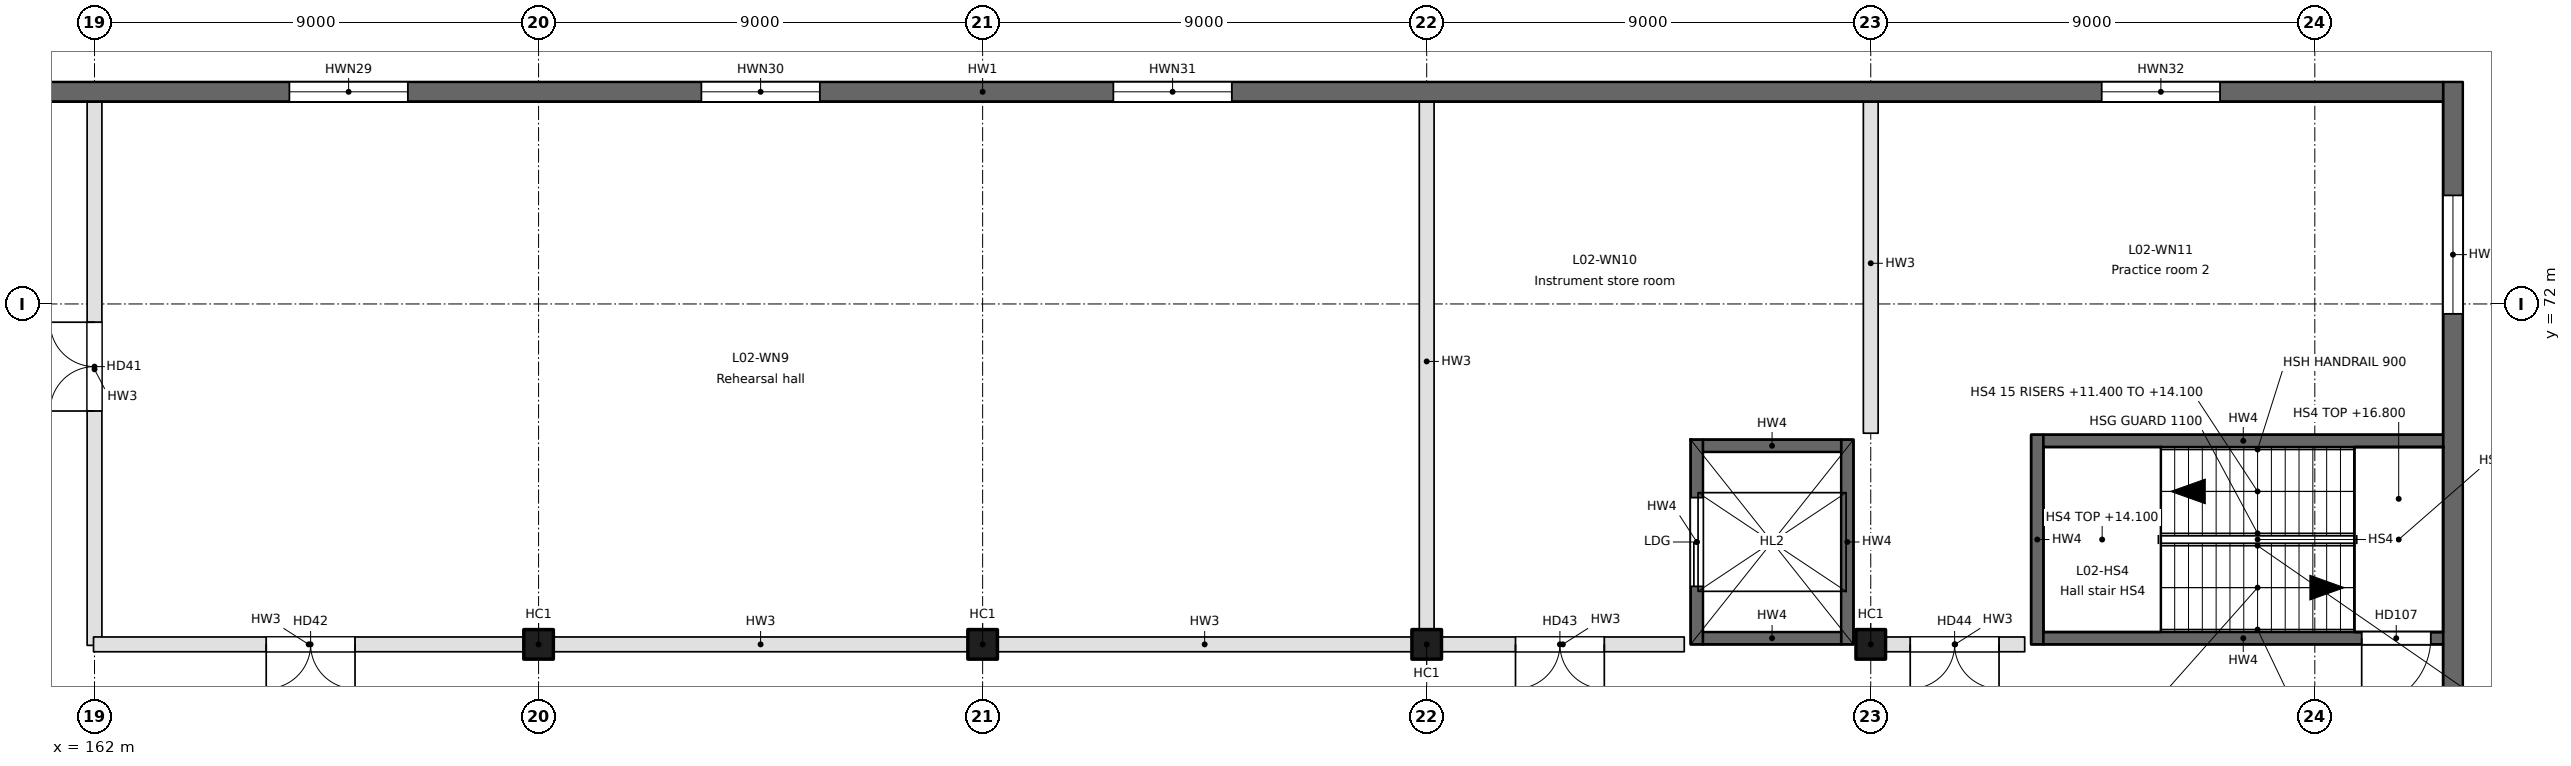
"""IFC4 building model, lengths in metres.
Left out: names, types, materials, properties, quantities, classifications, styles, units other than length and angle.
Written with IfcOpenShell. Run it as: python <this file> out.ifc"""

import sys

from ifc_helpers import new_model, si_unit, direction, frame, frame_2d, origin, origin_2d, place, context, subcontext, project, spatial, rectangle, extrude, element, fill, save


model = new_model("IFC4")
c1 = context("Model", 3, precision=1e-05, world=origin(), true_north=direction((0.0, 1.0)))
c2 = subcontext(c1, "Body", "Model", "MODEL_VIEW")
j1 = project(units=[si_unit("LENGTHUNIT", "METRE"), si_unit("PLANEANGLEUNIT", "RADIAN")], contexts=[c1])
p1 = place(None, origin())
s1 = spatial("IfcSite", under=j1, at=p1, CompositionType="ELEMENT")
p2 = place(p1, origin())
s2 = spatial("IfcBuilding", under=s1, at=p2, CompositionType="ELEMENT")
p3 = place(p2, frame((0.0, 0.0, 11.4)))
s3 = spatial("IfcBuildingStorey", under=s2, at=p3, CompositionType="ELEMENT", Elevation=11.4)
for number, where, z_axis, x_axis in (
    (1, (171.0, 65.1, 0.0), (0.0, 0.0, 1.0), (1.0, 0.0, 0.0)),
    (2, (180.0, 65.1, 0.0), (0.0, 0.0, 1.0), (1.0, 0.0, 0.0)),
    (3, (189.0, 65.1, 0.0), (0.0, 0.0, 1.0), (1.0, 0.0, 0.0)),
    (4, (198.0, 65.1, 0.0), (0.0, 0.0, 1.0), (1.0, 0.0, 0.0)),
):
    element("IfcColumn", number, at=place(p3, frame(where, z_axis=z_axis, x_axis=x_axis)), inside=s3, PredefinedType="COLUMN", context=c2, shape_type="SweptSolid", body=[
        extrude(rectangle(XDim=0.6, YDim=0.6, at=origin_2d()), origin(), (0.0, 0.0, 1.0), 5.4),
    ])
p4 = place(p3, frame((209.8, 76.5, -0.35), z_axis=(0.0, 0.0, 1.0), x_axis=(0.0, -1.0, 0.0)))
e5 = element("IfcWall", 5, at=p4, inside=s3, PredefinedType="SOLIDWALL", context=c2, shape_type="SweptSolid", body=[
    extrude(rectangle(XDim=54.0, YDim=0.4, at=frame_2d((27.0, 0.0))), origin(), (0.0, 0.0, 1.0), 5.4),
])
p5 = place(p4, frame((49.3, 0.0, 1.25)))
e6 = element("IfcOpeningElement", 6, at=p5, cuts=e5, PredefinedType="OPENING", context=c2, shape_type="SweptSolid", body=[
    extrude(rectangle(XDim=2.4, YDim=1.8, at=frame_2d((1.2, 0.9))), frame((0.0, 0.2, 0.0), z_axis=(0.0, -1.0, 0.0), x_axis=(1.0, 0.0, 0.0)), (0.0, 0.0, 1.0), 0.4),
])
p6 = place(p4, frame((2.3, 0.0, 1.25)))
e7 = element("IfcOpeningElement", 7, at=p6, cuts=e5, PredefinedType="OPENING", context=c2, shape_type="SweptSolid", body=[
    extrude(rectangle(XDim=2.4, YDim=1.8, at=frame_2d((1.2, 0.9))), frame((0.0, 0.2, 0.0), z_axis=(0.0, -1.0, 0.0), x_axis=(1.0, 0.0, 0.0)), (0.0, 0.0, 1.0), 0.4),
])
p7 = place(p3, frame((150.4, 76.3, -0.35), z_axis=(0.0, 0.0, 1.0), x_axis=(1.0, 0.0, 0.0)))
e8 = element("IfcWall", 8, at=p7, inside=s3, PredefinedType="SOLIDWALL", context=c2, shape_type="SweptSolid", body=[
    extrude(rectangle(XDim=59.2, YDim=0.4, at=frame_2d((29.6, 0.0))), origin(), (0.0, 0.0, 1.0), 5.4),
])
p8 = place(p7, frame((7.6, 0.0, 1.25)))
e9 = element("IfcOpeningElement", 9, at=p8, cuts=e8, PredefinedType="OPENING", context=c2, shape_type="SweptSolid", body=[
    extrude(rectangle(XDim=2.4, YDim=1.8, at=frame_2d((1.2, 0.9))), frame((0.0, 0.2, 0.0), z_axis=(0.0, -1.0, 0.0), x_axis=(1.0, 0.0, 0.0)), (0.0, 0.0, 1.0), 0.4),
])
p9 = place(p7, frame((15.55, 0.0, 1.25)))
e10 = element("IfcOpeningElement", 10, at=p9, cuts=e8, PredefinedType="OPENING", context=c2, shape_type="SweptSolid", body=[
    extrude(rectangle(XDim=2.4, YDim=1.8, at=frame_2d((1.2, 0.9))), frame((0.0, 0.2, 0.0), z_axis=(0.0, -1.0, 0.0), x_axis=(1.0, 0.0, 0.0)), (0.0, 0.0, 1.0), 0.4),
])
p10 = place(p7, frame((23.9, 0.0, 1.25)))
e11 = element("IfcOpeningElement", 11, at=p10, cuts=e8, PredefinedType="OPENING", context=c2, shape_type="SweptSolid", body=[
    extrude(rectangle(XDim=2.4, YDim=1.8, at=frame_2d((1.2, 0.9))), frame((0.0, 0.2, 0.0), z_axis=(0.0, -1.0, 0.0), x_axis=(1.0, 0.0, 0.0)), (0.0, 0.0, 1.0), 0.4),
])
p11 = place(p7, frame((32.25, 0.0, 1.25)))
e12 = element("IfcOpeningElement", 12, at=p11, cuts=e8, PredefinedType="OPENING", context=c2, shape_type="SweptSolid", body=[
    extrude(rectangle(XDim=2.4, YDim=1.8, at=frame_2d((1.2, 0.9))), frame((0.0, 0.2, 0.0), z_axis=(0.0, -1.0, 0.0), x_axis=(1.0, 0.0, 0.0)), (0.0, 0.0, 1.0), 0.4),
])
p12 = place(p7, frame((52.28, 0.0, 1.25)))
e13 = element("IfcOpeningElement", 13, at=p12, cuts=e8, PredefinedType="OPENING", context=c2, shape_type="SweptSolid", body=[
    extrude(rectangle(XDim=2.4, YDim=1.8, at=frame_2d((1.2, 0.9))), frame((0.0, 0.2, 0.0), z_axis=(0.0, -1.0, 0.0), x_axis=(1.0, 0.0, 0.0)), (0.0, 0.0, 1.0), 0.4),
])
p13 = place(p3, frame((162.0, 65.08, 0.0), z_axis=(0.0, 0.0, 1.0), x_axis=(0.0, 1.0, 0.0)))
e14 = element("IfcWall", 14, at=p13, inside=s3, PredefinedType="PARTITIONING", context=c2, shape_type="SweptSolid", body=[
    extrude(rectangle(XDim=11.19, YDim=0.3, at=frame_2d((5.595, 0.0))), origin(), (0.0, 0.0, 1.0), 5.05),
])
p14 = place(p13, frame((4.75, 0.0, 0.0)))
e15 = element("IfcOpeningElement", 15, at=p14, cuts=e14, PredefinedType="OPENING", context=c2, shape_type="SweptSolid", body=[
    extrude(rectangle(XDim=1.8, YDim=2.1, at=frame_2d((0.9, 1.05))), frame((0.0, 0.15, 0.0), z_axis=(0.0, -1.0, 0.0), x_axis=(1.0, 0.0, 0.0)), (0.0, 0.0, 1.0), 0.3),
])
p15 = place(p3, frame((198.0, 69.38, 0.0), z_axis=(0.0, 0.0, 1.0), x_axis=(0.0, 1.0, 0.0)))
e16 = element("IfcWall", 16, at=p15, inside=s3, PredefinedType="PARTITIONING", context=c2, shape_type="SweptSolid", body=[
    extrude(rectangle(XDim=6.89, YDim=0.3, at=frame_2d((3.445, 0.0))), origin(), (0.0, 0.0, 1.0), 5.05),
])
p16 = place(p3, frame((189.0, 65.4, 0.0), z_axis=(0.0, 0.0, 1.0), x_axis=(0.0, 1.0, 0.0)))
e17 = element("IfcWall", 17, at=p16, inside=s3, PredefinedType="PARTITIONING", context=c2, shape_type="SweptSolid", body=[
    extrude(rectangle(XDim=10.87, YDim=0.3, at=frame_2d((5.435, 0.0))), origin(), (0.0, 0.0, 1.0), 5.05),
])
p17 = place(p3, frame((170.7, 65.1, 0.0), z_axis=(0.0, 0.0, 1.0), x_axis=(-1.0, 0.0, 0.0)))
e18 = element("IfcWall", 18, at=p17, inside=s3, PredefinedType="PARTITIONING", context=c2, shape_type="SweptSolid", body=[
    extrude(rectangle(XDim=8.72, YDim=0.3, at=frame_2d((4.36, 0.0))), origin(), (0.0, 0.0, 1.0), 5.05),
])
p18 = place(p17, frame((3.42, 0.0, 0.0)))
e19 = element("IfcOpeningElement", 19, at=p18, cuts=e18, PredefinedType="OPENING", context=c2, shape_type="SweptSolid", body=[
    extrude(rectangle(XDim=1.8, YDim=2.1, at=frame_2d((0.9, 1.05))), frame((0.0, 0.15, 0.0), z_axis=(0.0, -1.0, 0.0), x_axis=(1.0, 0.0, 0.0)), (0.0, 0.0, 1.0), 0.3),
])
for number, where, z_axis, x_axis in (
    (20, (179.7, 65.1, 0.0), (0.0, 0.0, 1.0), (-1.0, 0.0, 0.0)),
    (21, (188.7, 65.1, 0.0), (0.0, 0.0, 1.0), (-1.0, 0.0, 0.0)),
):
    element("IfcWall", number, at=place(p3, frame(where, z_axis=z_axis, x_axis=x_axis)), inside=s3, PredefinedType="PARTITIONING", context=c2, shape_type="SweptSolid", body=[
        extrude(rectangle(XDim=8.4, YDim=0.3, at=frame_2d((4.2, 0.0))), origin(), (0.0, 0.0, 1.0), 5.05),
    ])
p19 = place(p3, frame((194.22, 65.1, 0.0), z_axis=(0.0, 0.0, 1.0), x_axis=(-1.0, 0.0, 0.0)))
e22 = element("IfcWall", 22, at=p19, inside=s3, PredefinedType="PARTITIONING", context=c2, shape_type="SweptSolid", body=[
    extrude(rectangle(XDim=4.92, YDim=0.3, at=frame_2d((2.46, 0.0))), origin(), (0.0, 0.0, 1.0), 5.05),
])
p20 = place(p19, frame((1.62, 0.0, 0.0)))
e23 = element("IfcOpeningElement", 23, at=p20, cuts=e22, PredefinedType="OPENING", context=c2, shape_type="SweptSolid", body=[
    extrude(rectangle(XDim=1.8, YDim=2.1, at=frame_2d((0.9, 1.05))), frame((0.0, 0.15, 0.0), z_axis=(0.0, -1.0, 0.0), x_axis=(1.0, 0.0, 0.0)), (0.0, 0.0, 1.0), 0.3),
])
p21 = place(p3, frame((201.12, 65.1, 0.0), z_axis=(0.0, 0.0, 1.0), x_axis=(-1.0, 0.0, 0.0)))
e24 = element("IfcWall", 24, at=p21, inside=s3, PredefinedType="PARTITIONING", context=c2, shape_type="SweptSolid", body=[
    extrude(rectangle(XDim=2.82, YDim=0.3, at=frame_2d((1.41, 0.0))), origin(), (0.0, 0.0, 1.0), 5.05),
])
p22 = place(p21, frame((0.52, 0.0, 0.0)))
e25 = element("IfcOpeningElement", 25, at=p22, cuts=e24, PredefinedType="OPENING", context=c2, shape_type="SweptSolid", body=[
    extrude(rectangle(XDim=1.8, YDim=2.1, at=frame_2d((0.9, 1.05))), frame((0.0, 0.15, 0.0), z_axis=(0.0, -1.0, 0.0), x_axis=(1.0, 0.0, 0.0)), (0.0, 0.0, 1.0), 0.3),
])
p23 = place(p3, frame((201.375, 65.1, -0.35), z_axis=(0.0, 0.0, 1.0), x_axis=(0.0, 1.0, 0.0)))
e26 = element("IfcWall", 26, at=p23, inside=s3, PredefinedType="SOLIDWALL", context=c2, shape_type="SweptSolid", body=[
    extrude(rectangle(XDim=4.25, YDim=0.25, at=frame_2d((2.125, 0.0))), origin(), (0.0, 0.0, 1.0), 5.4),
])
p24 = place(p3, frame((209.6, 65.225, -0.35), z_axis=(0.0, 0.0, 1.0), x_axis=(-1.0, 0.0, 0.0)))
e27 = element("IfcWall", 27, at=p24, inside=s3, PredefinedType="SOLIDWALL", context=c2, shape_type="SweptSolid", body=[
    extrude(rectangle(XDim=8.1, YDim=0.25, at=frame_2d((4.05, 0.0))), origin(), (0.0, 0.0, 1.0), 5.4),
])
p25 = place(p24, frame((0.25, 0.0, 0.35)))
e28 = element("IfcOpeningElement", 28, at=p25, cuts=e27, PredefinedType="OPENING", context=c2, shape_type="SweptSolid", body=[
    extrude(rectangle(XDim=1.4, YDim=2.1, at=frame_2d((0.7, 1.05))), frame((0.0, 0.125, 0.0), z_axis=(0.0, -1.0, 0.0), x_axis=(1.0, 0.0, 0.0)), (0.0, 0.0, 1.0), 0.25),
])
p26 = place(p3, frame((201.5, 69.225, -0.35), z_axis=(0.0, 0.0, 1.0), x_axis=(1.0, 0.0, 0.0)))
e29 = element("IfcWall", 29, at=p26, inside=s3, PredefinedType="SOLIDWALL", context=c2, shape_type="SweptSolid", body=[
    extrude(rectangle(XDim=8.1, YDim=0.25, at=frame_2d((4.05, 0.0))), origin(), (0.0, 0.0, 1.0), 5.4),
])
p27 = place(p3, frame((194.475, 65.1, -0.35), z_axis=(0.0, 0.0, 1.0), x_axis=(0.0, 1.0, 0.0)))
e30 = element("IfcWall", 30, at=p27, inside=s3, PredefinedType="SOLIDWALL", context=c2, shape_type="SweptSolid", body=[
    extrude(rectangle(XDim=4.15, YDim=0.25, at=frame_2d((2.075, 0.0))), origin(), (0.0, 0.0, 1.0), 5.4),
])
p28 = place(p27, frame((1.175, 0.0, 0.35)))
e31 = element("IfcOpeningElement", 31, at=p28, cuts=e30, PredefinedType="OPENING", context=c2, shape_type="SweptSolid", body=[
    extrude(rectangle(XDim=1.8, YDim=2.4, at=frame_2d((0.9, 1.2))), frame((0.0, 0.125, 0.0), z_axis=(0.0, -1.0, 0.0), x_axis=(1.0, 0.0, 0.0)), (0.0, 0.0, 1.0), 0.25),
])
p29 = place(p3, frame((197.525, 69.25, -0.35), z_axis=(0.0, 0.0, 1.0), x_axis=(0.0, -1.0, 0.0)))
e32 = element("IfcWall", 32, at=p29, inside=s3, PredefinedType="SOLIDWALL", context=c2, shape_type="SweptSolid", body=[
    extrude(rectangle(XDim=4.15, YDim=0.25, at=frame_2d((2.075, 0.0))), origin(), (0.0, 0.0, 1.0), 5.4),
])
for number, where, z_axis, x_axis in (
    (33, (197.4, 65.225, -0.35), (0.0, 0.0, 1.0), (-1.0, 0.0, 0.0)),
    (34, (194.6, 69.125, -0.35), (0.0, 0.0, 1.0), (1.0, 0.0, 0.0)),
):
    element("IfcWall", number, at=place(p3, frame(where, z_axis=z_axis, x_axis=x_axis)), inside=s3, PredefinedType="SOLIDWALL", context=c2, shape_type="SweptSolid", body=[
        extrude(rectangle(XDim=2.8, YDim=0.25, at=frame_2d((1.4, 0.0))), origin(), (0.0, 0.0, 1.0), 5.4),
    ])
p30 = place(p14, origin())
e35 = element("IfcDoor", 35, at=p30, inside=s3, OperationType="DOUBLE_DOOR_SINGLE_SWING", PredefinedType="DOOR", context=c2, shape_type="SweptSolid", body=[
    extrude(rectangle(XDim=1.8, YDim=2.1, at=frame_2d((0.9, 1.05))), frame((0.0, 0.025, 0.0), z_axis=(0.0, -1.0, 0.0), x_axis=(1.0, 0.0, 0.0)), (0.0, 0.0, 1.0), 0.05),
])
fill(e15, e35)
p31 = place(p18, origin())
e36 = element("IfcDoor", 36, at=p31, inside=s3, OperationType="DOUBLE_DOOR_SINGLE_SWING", PredefinedType="DOOR", context=c2, shape_type="SweptSolid", body=[
    extrude(rectangle(XDim=1.8, YDim=2.1, at=frame_2d((0.9, 1.05))), frame((0.0, 0.025, 0.0), z_axis=(0.0, -1.0, 0.0), x_axis=(1.0, 0.0, 0.0)), (0.0, 0.0, 1.0), 0.05),
])
fill(e19, e36)
p32 = place(p20, origin())
e37 = element("IfcDoor", 37, at=p32, inside=s3, OperationType="DOUBLE_DOOR_SINGLE_SWING", PredefinedType="DOOR", context=c2, shape_type="SweptSolid", body=[
    extrude(rectangle(XDim=1.8, YDim=2.1, at=frame_2d((0.9, 1.05))), frame((0.0, 0.025, 0.0), z_axis=(0.0, -1.0, 0.0), x_axis=(1.0, 0.0, 0.0)), (0.0, 0.0, 1.0), 0.05),
])
fill(e23, e37)
p33 = place(p22, origin())
e38 = element("IfcDoor", 38, at=p33, inside=s3, OperationType="DOUBLE_DOOR_SINGLE_SWING", PredefinedType="DOOR", context=c2, shape_type="SweptSolid", body=[
    extrude(rectangle(XDim=1.8, YDim=2.1, at=frame_2d((0.9, 1.05))), frame((0.0, 0.025, 0.0), z_axis=(0.0, -1.0, 0.0), x_axis=(1.0, 0.0, 0.0)), (0.0, 0.0, 1.0), 0.05),
])
fill(e25, e38)
p34 = place(p6, origin())
e39 = element("IfcWindow", 39, at=p34, inside=s3, PartitioningType="SINGLE_PANEL", PredefinedType="WINDOW", context=c2, shape_type="SweptSolid", body=[
    extrude(rectangle(XDim=2.4, YDim=1.8, at=frame_2d((1.2, 0.9))), frame((0.0, 0.03, 0.0), z_axis=(0.0, -1.0, 0.0), x_axis=(1.0, 0.0, 0.0)), (0.0, 0.0, 1.0), 0.06),
])
fill(e7, e39)
p35 = place(p9, origin())
e40 = element("IfcWindow", 40, at=p35, inside=s3, PartitioningType="SINGLE_PANEL", PredefinedType="WINDOW", context=c2, shape_type="SweptSolid", body=[
    extrude(rectangle(XDim=2.4, YDim=1.8, at=frame_2d((1.2, 0.9))), frame((0.0, 0.03, 0.0), z_axis=(0.0, -1.0, 0.0), x_axis=(1.0, 0.0, 0.0)), (0.0, 0.0, 1.0), 0.06),
])
fill(e10, e40)
p36 = place(p10, origin())
e41 = element("IfcWindow", 41, at=p36, inside=s3, PartitioningType="SINGLE_PANEL", PredefinedType="WINDOW", context=c2, shape_type="SweptSolid", body=[
    extrude(rectangle(XDim=2.4, YDim=1.8, at=frame_2d((1.2, 0.9))), frame((0.0, 0.03, 0.0), z_axis=(0.0, -1.0, 0.0), x_axis=(1.0, 0.0, 0.0)), (0.0, 0.0, 1.0), 0.06),
])
fill(e11, e41)
p37 = place(p11, origin())
e42 = element("IfcWindow", 42, at=p37, inside=s3, PartitioningType="SINGLE_PANEL", PredefinedType="WINDOW", context=c2, shape_type="SweptSolid", body=[
    extrude(rectangle(XDim=2.4, YDim=1.8, at=frame_2d((1.2, 0.9))), frame((0.0, 0.03, 0.0), z_axis=(0.0, -1.0, 0.0), x_axis=(1.0, 0.0, 0.0)), (0.0, 0.0, 1.0), 0.06),
])
fill(e12, e42)
p38 = place(p12, origin())
e43 = element("IfcWindow", 43, at=p38, inside=s3, PartitioningType="SINGLE_PANEL", PredefinedType="WINDOW", context=c2, shape_type="SweptSolid", body=[
    extrude(rectangle(XDim=2.4, YDim=1.8, at=frame_2d((1.2, 0.9))), frame((0.0, 0.03, 0.0), z_axis=(0.0, -1.0, 0.0), x_axis=(1.0, 0.0, 0.0)), (0.0, 0.0, 1.0), 0.06),
])
fill(e13, e43)
p39 = place(p25, origin())
e44 = element("IfcDoor", 44, at=p39, inside=s3, OperationType="SINGLE_SWING_RIGHT", PredefinedType="DOOR", context=c2, shape_type="SweptSolid", body=[
    extrude(rectangle(XDim=1.4, YDim=2.1, at=frame_2d((0.7, 1.05))), frame((0.0, 0.025, 0.0), z_axis=(0.0, -1.0, 0.0), x_axis=(1.0, 0.0, 0.0)), (0.0, 0.0, 1.0), 0.05),
])
fill(e28, e44)
p40 = place(p28, origin())
e45 = element("IfcDoor", 45, at=p40, inside=s3, OperationType="SLIDING_TO_RIGHT", PredefinedType="DOOR", context=c2, shape_type="SweptSolid", body=[
    extrude(rectangle(XDim=1.8, YDim=2.4, at=frame_2d((0.9, 1.2))), frame((0.0, 0.025, 0.0), z_axis=(0.0, -1.0, 0.0), x_axis=(1.0, 0.0, 0.0)), (0.0, 0.0, 1.0), 0.05),
])
fill(e31, e45)
save(model, sys.argv[1])
